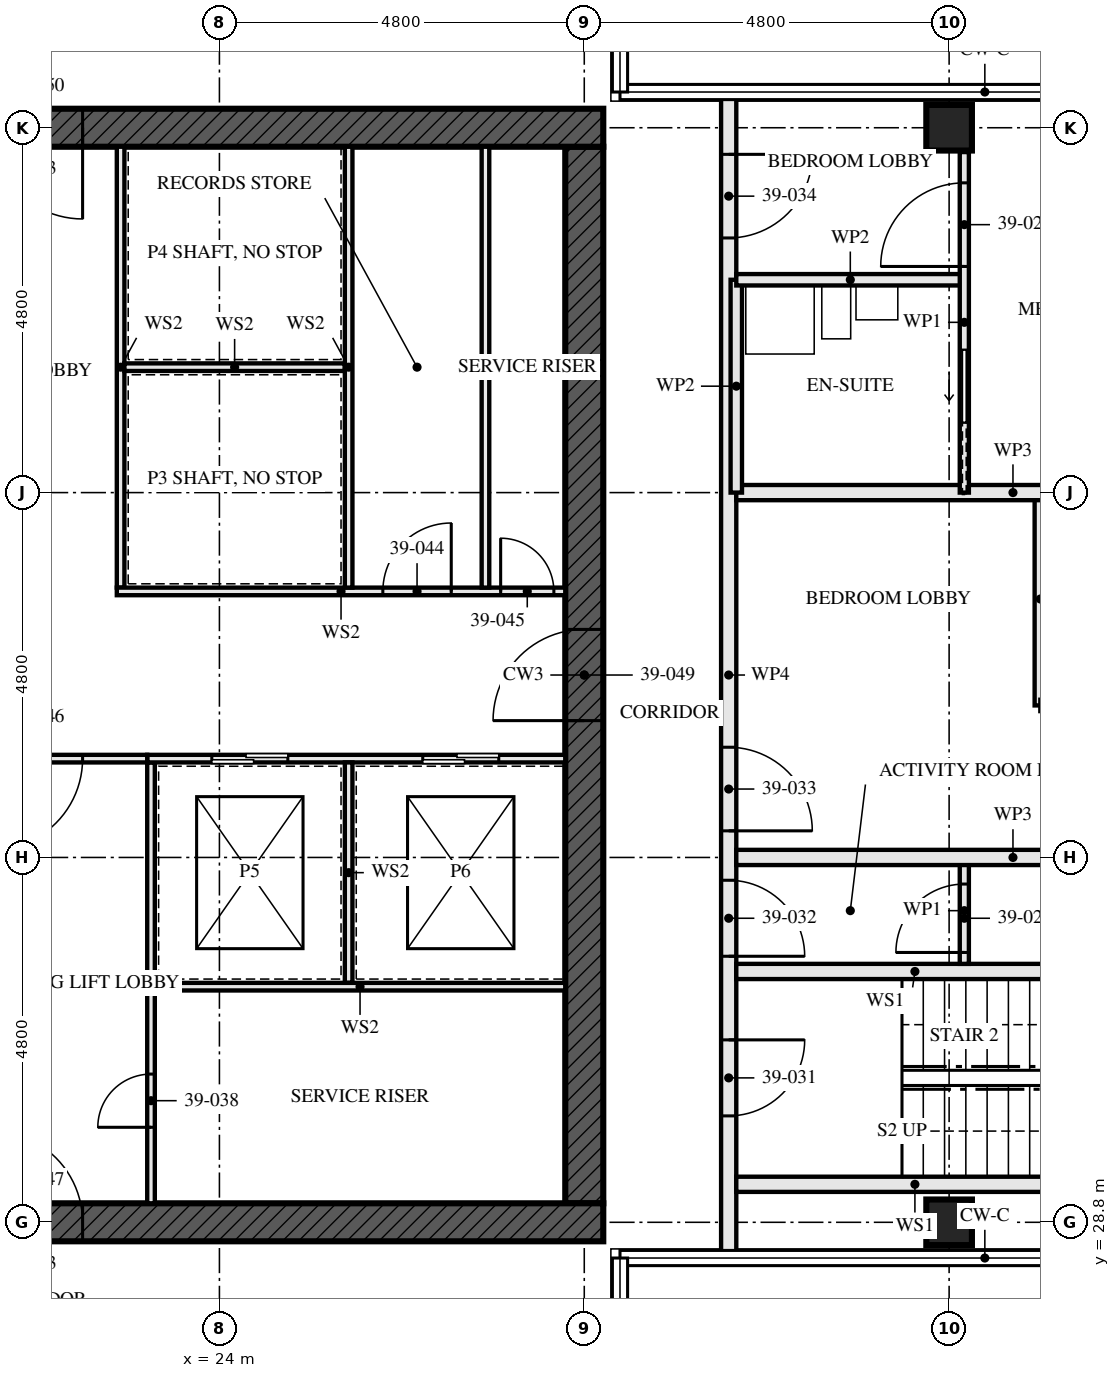
"""IFC4 building model, lengths in metres.
Left out: names, types, materials, properties, quantities, classifications, styles, units other than length and angle.
Written with IfcOpenShell. Run it as: python <this file> out.ifc"""

import sys

from ifc_helpers import new_model, si_unit, direction, frame, frame_2d, origin, origin_2d, place, context, subcontext, project, spatial, rectangle, hollow_rectangle, extrude, element, fill, save


model = new_model("IFC4")
c1 = context("Model", 3, precision=1e-05, world=origin(), true_north=direction((0.0, 1.0)))
c2 = subcontext(c1, "Body", "Model", "MODEL_VIEW")
j1 = project(units=[si_unit("LENGTHUNIT", "METRE"), si_unit("PLANEANGLEUNIT", "RADIAN")], contexts=[c1])
p1 = place(None, origin())
s1 = spatial("IfcSite", under=j1, at=p1, CompositionType="ELEMENT")
p2 = place(p1, origin())
s2 = spatial("IfcBuilding", under=s1, at=p2, CompositionType="ELEMENT")
p3 = place(p2, frame((0.0, 0.0, 144.5)))
s3 = spatial("IfcBuildingStorey", under=s2, at=p3, CompositionType="ELEMENT", Elevation=144.5)
for number, where, z_axis, x_axis in (
    (1, (33.6, 28.8, 0.0), (0.0, 0.0, 1.0), (0.0, 1.0, 0.0)),
    (2, (33.6, 43.2, 0.0), (0.0, 0.0, 1.0), (0.0, 1.0, 0.0)),
):
    element("IfcColumn", number, at=place(p3, frame(where, z_axis=z_axis, x_axis=x_axis)), inside=s3, PredefinedType="COLUMN", context=c2, shape_type="SweptSolid", body=[
        extrude(hollow_rectangle(XDim=0.6, YDim=0.6, WallThickness=0.08, at=origin_2d()), origin(), (0.0, 0.0, 1.0), 3.5),
    ])
p4 = place(p3, frame((14.15, 28.8, -0.17), z_axis=(0.0, 0.0, 1.0), x_axis=(1.0, 0.0, 0.0)))
e3 = element("IfcWall", 3, at=p4, inside=s3, PredefinedType="SHEAR", context=c2, shape_type="SweptSolid", body=[
    extrude(rectangle(XDim=14.9, YDim=0.5, at=frame_2d((7.45, 0.0))), origin(), (0.0, 0.0, 1.0), 3.5),
])
p5 = place(p4, frame((6.85, 0.0, 0.17)))
e4 = element("IfcOpeningElement", 4, at=p5, cuts=e3, PredefinedType="OPENING", context=c2, shape_type="SweptSolid", body=[
    extrude(rectangle(XDim=1.2, YDim=2.1, at=frame_2d((0.6, 1.05))), frame((0.0, 0.26, 0.0), z_axis=(0.0, -1.0, 0.0), x_axis=(1.0, 0.0, 0.0)), (0.0, 0.0, 1.0), 0.521),
])
p6 = place(p3, frame((29.05, 43.2, -0.17), z_axis=(0.0, 0.0, 1.0), x_axis=(-1.0, 0.0, 0.0)))
e5 = element("IfcWall", 5, at=p6, inside=s3, PredefinedType="SHEAR", context=c2, shape_type="SweptSolid", body=[
    extrude(rectangle(XDim=14.9, YDim=0.5, at=frame_2d((7.45, 0.0))), origin(), (0.0, 0.0, 1.0), 3.5),
])
p7 = place(p6, frame((6.85, 0.0, 0.17)))
e6 = element("IfcOpeningElement", 6, at=p7, cuts=e5, PredefinedType="OPENING", context=c2, shape_type="SweptSolid", body=[
    extrude(rectangle(XDim=1.2, YDim=2.1, at=frame_2d((0.6, 1.05))), frame((0.0, 0.26, 0.0), z_axis=(0.0, -1.0, 0.0), x_axis=(1.0, 0.0, 0.0)), (0.0, 0.0, 1.0), 0.521),
])
p8 = place(p3, frame((28.8, 29.05, -0.17), z_axis=(0.0, 0.0, 1.0), x_axis=(0.0, 1.0, 0.0)))
e7 = element("IfcWall", 7, at=p8, inside=s3, PredefinedType="SHEAR", context=c2, shape_type="SweptSolid", body=[
    extrude(rectangle(XDim=13.9, YDim=0.5, at=frame_2d((6.95, 0.0))), origin(), (0.0, 0.0, 1.0), 3.5),
])
p9 = place(p8, frame((6.35, 0.0, 0.17)))
e8 = element("IfcOpeningElement", 8, at=p9, cuts=e7, PredefinedType="OPENING", context=c2, shape_type="SweptSolid", body=[
    extrude(rectangle(XDim=1.2, YDim=2.1, at=frame_2d((0.6, 1.05))), frame((0.0, 0.26, 0.0), z_axis=(0.0, -1.0, 0.0), x_axis=(1.0, 0.0, 0.0)), (0.0, 0.0, 1.0), 0.521),
])
for number, where, z_axis, x_axis in (
    (9, (35.5, 29.3, 0.0), (0.0, 0.0, 1.0), (-1.0, 0.0, 0.0)),
    (10, (35.5, 32.1, 0.0), (0.0, 0.0, 1.0), (-1.0, 0.0, 0.0)),
):
    element("IfcWall", number, at=place(p3, frame(where, z_axis=z_axis, x_axis=x_axis)), inside=s3, PredefinedType="SOLIDWALL", context=c2, shape_type="SweptSolid", body=[
        extrude(rectangle(XDim=4.7, YDim=0.2, at=frame_2d((2.35, 0.0))), origin(), (0.0, 0.0, 1.0), 2.99),
    ])
p10 = place(p3, frame((33.8, 32.2, 0.0), z_axis=(0.0, 0.0, 1.0), x_axis=(0.0, 1.0, 0.0)))
e11 = element("IfcWall", 11, at=p10, inside=s3, PredefinedType="PARTITIONING", context=c2, shape_type="SweptSolid", body=[
    extrude(rectangle(XDim=1.4, YDim=0.12, at=frame_2d((0.7, 0.0))), origin(), (0.0, 0.0, 1.0), 3.33),
])
p11 = place(p10, frame((0.15, 0.0, 0.0)))
e12 = element("IfcOpeningElement", 12, at=p11, cuts=e11, PredefinedType="OPENING", context=c2, shape_type="SweptSolid", body=[
    extrude(rectangle(XDim=0.9, YDim=2.1, at=frame_2d((0.45, 1.05))), frame((0.0, 0.071, 0.0), z_axis=(0.0, -1.0, 0.0), x_axis=(1.0, 0.0, 0.0)), (0.0, 0.0, 1.0), 0.141),
])
p12 = place(p3, frame((38.08, 33.6, 0.0), z_axis=(0.0, 0.0, 1.0), x_axis=(-1.0, 0.0, 0.0)))
e13 = element("IfcWall", 13, at=p12, inside=s3, PredefinedType="PARTITIONING", context=c2, shape_type="SweptSolid", body=[
    extrude(rectangle(XDim=7.28, YDim=0.2, at=frame_2d((3.64, 0.0))), origin(), (0.0, 0.0, 1.0), 2.55),
])
p13 = place(p3, frame((34.8, 35.6, 0.0), z_axis=(0.0, 0.0, 1.0), x_axis=(0.0, 1.0, 0.0)))
e14 = element("IfcWall", 14, at=p13, inside=s3, PredefinedType="PARTITIONING", context=c2, shape_type="SweptSolid", body=[
    extrude(rectangle(XDim=2.8, YDim=0.15, at=frame_2d((1.4, 0.0))), origin(), (0.0, 0.0, 1.0), 3.33),
])
p14 = place(p3, frame((38.08, 38.4, 0.0), z_axis=(0.0, 0.0, 1.0), x_axis=(-1.0, 0.0, 0.0)))
e15 = element("IfcWall", 15, at=p14, inside=s3, PredefinedType="PARTITIONING", context=c2, shape_type="SweptSolid", body=[
    extrude(rectangle(XDim=7.28, YDim=0.2, at=frame_2d((3.64, 0.0))), origin(), (0.0, 0.0, 1.0), 2.55),
])
p15 = place(p3, frame((33.8, 41.2, 0.0), z_axis=(0.0, 0.0, 1.0), x_axis=(-1.0, 0.0, 0.0)))
e16 = element("IfcWall", 16, at=p15, inside=s3, PredefinedType="PARTITIONING", context=c2, shape_type="SweptSolid", body=[
    extrude(rectangle(XDim=3.0, YDim=0.15, at=frame_2d((1.5, 0.0))), origin(), (0.0, 0.0, 1.0), 3.33),
])
p16 = place(p3, frame((30.8, 38.4, 0.0), z_axis=(0.0, 0.0, 1.0), x_axis=(0.0, 1.0, 0.0)))
e17 = element("IfcWall", 17, at=p16, inside=s3, PredefinedType="PARTITIONING", context=c2, shape_type="SweptSolid", body=[
    extrude(rectangle(XDim=2.8, YDim=0.15, at=frame_2d((1.4, 0.0))), origin(), (0.0, 0.0, 1.0), 3.33),
])
p17 = place(p3, frame((33.8, 38.4, 0.0), z_axis=(0.0, 0.0, 1.0), x_axis=(0.0, 1.0, 0.0)))
e18 = element("IfcWall", 18, at=p17, inside=s3, PredefinedType="PARTITIONING", context=c2, shape_type="SweptSolid", body=[
    extrude(rectangle(XDim=4.48, YDim=0.12, at=frame_2d((2.24, 0.0))), origin(), (0.0, 0.0, 1.0), 3.33),
])
p18 = place(p17, frame((2.975, 0.0, 0.0)))
e19 = element("IfcOpeningElement", 19, at=p18, cuts=e18, PredefinedType="OPENING", context=c2, shape_type="SweptSolid", body=[
    extrude(rectangle(XDim=1.1, YDim=2.1, at=frame_2d((0.55, 1.05))), frame((0.0, 0.071, 0.0), z_axis=(0.0, -1.0, 0.0), x_axis=(1.0, 0.0, 0.0)), (0.0, 0.0, 1.0), 0.141),
])
p19 = place(p17, frame((0.925, 0.0, 0.0)))
e20 = element("IfcOpeningElement", 20, at=p19, cuts=e18, PredefinedType="OPENING", context=c2, shape_type="SweptSolid", body=[
    extrude(rectangle(XDim=0.95, YDim=2.1, at=frame_2d((0.475, 1.05))), frame((0.0, 0.071, 0.0), z_axis=(0.0, -1.0, 0.0), x_axis=(1.0, 0.0, 0.0)), (0.0, 0.0, 1.0), 0.141),
])
p20 = place(p3, frame((30.7, 28.35, 0.0), z_axis=(0.0, 0.0, 1.0), x_axis=(0.0, 1.0, 0.0)))
e21 = element("IfcWall", 21, at=p20, inside=s3, PredefinedType="PARTITIONING", context=c2, shape_type="SweptSolid", body=[
    extrude(rectangle(XDim=15.3, YDim=0.2, at=frame_2d((7.65, 0.0))), origin(), (0.0, 0.0, 1.0), 2.32),
])
p21 = place(p20, frame((1.85, 0.0, 0.0)))
e22 = element("IfcOpeningElement", 22, at=p21, cuts=e21, PredefinedType="OPENING", context=c2, shape_type="SweptSolid", body=[
    extrude(rectangle(XDim=1.0, YDim=2.1, at=frame_2d((0.5, 1.05))), frame((0.0, 0.111, 0.0), z_axis=(0.0, -1.0, 0.0), x_axis=(1.0, 0.0, 0.0)), (0.0, 0.0, 1.0), 0.221),
])
p22 = place(p20, frame((3.95, 0.0, 0.0)))
e23 = element("IfcOpeningElement", 23, at=p22, cuts=e21, PredefinedType="OPENING", context=c2, shape_type="SweptSolid", body=[
    extrude(rectangle(XDim=1.0, YDim=2.1, at=frame_2d((0.5, 1.05))), frame((0.0, 0.111, 0.0), z_axis=(0.0, -1.0, 0.0), x_axis=(1.0, 0.0, 0.0)), (0.0, 0.0, 1.0), 0.221),
])
p23 = place(p20, frame((5.6, 0.0, 0.0)))
e24 = element("IfcOpeningElement", 24, at=p23, cuts=e21, PredefinedType="OPENING", context=c2, shape_type="SweptSolid", body=[
    extrude(rectangle(XDim=1.1, YDim=2.1, at=frame_2d((0.55, 1.05))), frame((0.0, 0.111, 0.0), z_axis=(0.0, -1.0, 0.0), x_axis=(1.0, 0.0, 0.0)), (0.0, 0.0, 1.0), 0.221),
])
p24 = place(p20, frame((13.4, 0.0, 0.0)))
e25 = element("IfcOpeningElement", 25, at=p24, cuts=e21, PredefinedType="OPENING", context=c2, shape_type="SweptSolid", body=[
    extrude(rectangle(XDim=1.1, YDim=2.1, at=frame_2d((0.55, 1.05))), frame((0.0, 0.111, 0.0), z_axis=(0.0, -1.0, 0.0), x_axis=(1.0, 0.0, 0.0)), (0.0, 0.0, 1.0), 0.221),
])
for number, where, z_axis, x_axis in (
    (26, (27.5, 37.15, 0.0), (0.0, 0.0, 1.0), (0.0, 1.0, 0.0)),
    (27, (22.7, 37.15, 0.0), (0.0, 0.0, 1.0), (0.0, 1.0, 0.0)),
):
    element("IfcWall", number, at=place(p3, frame(where, z_axis=z_axis, x_axis=x_axis)), inside=s3, PredefinedType="SOLIDWALL", context=c2, shape_type="SweptSolid", body=[
        extrude(rectangle(XDim=5.8, YDim=0.1, at=frame_2d((2.9, 0.0))), origin(), (0.0, 0.0, 1.0), 3.33),
    ])
p25 = place(p3, frame((23.1, 29.05, 0.0), z_axis=(0.0, 0.0, 1.0), x_axis=(0.0, 1.0, 0.0)))
e28 = element("IfcWall", 28, at=p25, inside=s3, PredefinedType="SOLIDWALL", context=c2, shape_type="SweptSolid", body=[
    extrude(rectangle(XDim=5.8, YDim=0.1, at=frame_2d((2.9, 0.0))), origin(), (0.0, 0.0, 1.0), 3.33),
])
p26 = place(p25, frame((1.0, 0.0, 0.0)))
e29 = element("IfcOpeningElement", 29, at=p26, cuts=e28, PredefinedType="OPENING", context=c2, shape_type="SweptSolid", body=[
    extrude(rectangle(XDim=0.7, YDim=2.1, at=frame_2d((0.35, 1.05))), frame((0.0, 0.061, 0.0), z_axis=(0.0, -1.0, 0.0), x_axis=(1.0, 0.0, 0.0)), (0.0, 0.0, 1.0), 0.121),
])
p27 = place(p3, frame((23.05, 34.9, 0.0), z_axis=(0.0, 0.0, 1.0), x_axis=(1.0, 0.0, 0.0)))
e30 = element("IfcWall", 30, at=p27, inside=s3, PredefinedType="SOLIDWALL", context=c2, shape_type="SweptSolid", body=[
    extrude(rectangle(XDim=5.5, YDim=0.1, at=frame_2d((2.75, 0.0))), origin(), (0.0, 0.0, 1.0), 3.33),
])
p28 = place(p27, frame((0.85, 0.0, 0.0)))
e31 = element("IfcOpeningElement", 31, at=p28, cuts=e30, PredefinedType="OPENING", context=c2, shape_type="SweptSolid", body=[
    extrude(rectangle(XDim=1.0, YDim=2.1, at=frame_2d((0.5, 1.05))), frame((0.0, 0.061, 0.0), z_axis=(0.0, -1.0, 0.0), x_axis=(1.0, 0.0, 0.0)), (0.0, 0.0, 1.0), 0.121),
])
p29 = place(p27, frame((3.625, 0.0, 0.0)))
e32 = element("IfcOpeningElement", 32, at=p29, cuts=e30, PredefinedType="OPENING", context=c2, shape_type="SweptSolid", body=[
    extrude(rectangle(XDim=1.0, YDim=2.1, at=frame_2d((0.5, 1.05))), frame((0.0, 0.061, 0.0), z_axis=(0.0, -1.0, 0.0), x_axis=(1.0, 0.0, 0.0)), (0.0, 0.0, 1.0), 0.121),
])
p30 = place(p3, frame((22.65, 37.1, 0.0), z_axis=(0.0, 0.0, 1.0), x_axis=(1.0, 0.0, 0.0)))
e33 = element("IfcWall", 33, at=p30, inside=s3, PredefinedType="SOLIDWALL", context=c2, shape_type="SweptSolid", body=[
    extrude(rectangle(XDim=5.9, YDim=0.1, at=frame_2d((2.95, 0.0))), origin(), (0.0, 0.0, 1.0), 3.33),
])
p31 = place(p30, frame((3.5, 0.0, 0.0)))
e34 = element("IfcOpeningElement", 34, at=p31, cuts=e33, PredefinedType="OPENING", context=c2, shape_type="SweptSolid", body=[
    extrude(rectangle(XDim=0.9, YDim=2.1, at=frame_2d((0.45, 1.05))), frame((0.0, 0.061, 0.0), z_axis=(0.0, -1.0, 0.0), x_axis=(1.0, 0.0, 0.0)), (0.0, 0.0, 1.0), 0.121),
])
p32 = place(p30, frame((5.05, 0.0, 0.0)))
e35 = element("IfcOpeningElement", 35, at=p32, cuts=e33, PredefinedType="OPENING", context=c2, shape_type="SweptSolid", body=[
    extrude(rectangle(XDim=0.7, YDim=2.1, at=frame_2d((0.35, 1.05))), frame((0.0, 0.061, 0.0), z_axis=(0.0, -1.0, 0.0), x_axis=(1.0, 0.0, 0.0)), (0.0, 0.0, 1.0), 0.121),
])
p33 = place(p3, frame((20.55, 34.9, 0.0), z_axis=(0.0, 0.0, 1.0), x_axis=(1.0, 0.0, 0.0)))
e36 = element("IfcWall", 36, at=p33, inside=s3, PredefinedType="SOLIDWALL", context=c2, shape_type="SweptSolid", body=[
    extrude(rectangle(XDim=2.5, YDim=0.1, at=frame_2d((1.25, 0.0))), origin(), (0.0, 0.0, 1.0), 3.33),
])
p34 = place(p33, frame((0.45, 0.0, 0.0)))
e37 = element("IfcOpeningElement", 37, at=p34, cuts=e36, PredefinedType="OPENING", context=c2, shape_type="SweptSolid", body=[
    extrude(rectangle(XDim=1.2, YDim=2.1, at=frame_2d((0.6, 1.05))), frame((0.0, 0.061, 0.0), z_axis=(0.0, -1.0, 0.0), x_axis=(1.0, 0.0, 0.0)), (0.0, 0.0, 1.0), 0.121),
])
p35 = place(p3, frame((22.75, 40.05, 0.0), z_axis=(0.0, 0.0, 1.0), x_axis=(1.0, 0.0, 0.0)))
e38 = element("IfcWall", 38, at=p35, inside=s3, PredefinedType="SOLIDWALL", context=c2, shape_type="SweptSolid", body=[
    extrude(rectangle(XDim=2.9, YDim=0.1, at=frame_2d((1.45, 0.0))), origin(), (0.0, 0.0, 1.0), 3.33),
])
p36 = place(p3, frame((25.7, 37.15, 0.0), z_axis=(0.0, 0.0, 1.0), x_axis=(0.0, 1.0, 0.0)))
e39 = element("IfcWall", 39, at=p36, inside=s3, PredefinedType="SOLIDWALL", context=c2, shape_type="SweptSolid", body=[
    extrude(rectangle(XDim=5.8, YDim=0.1, at=frame_2d((2.9, 0.0))), origin(), (0.0, 0.0, 1.0), 3.33),
])
p37 = place(p3, frame((25.7, 31.95, 0.0), z_axis=(0.0, 0.0, 1.0), x_axis=(0.0, 1.0, 0.0)))
e40 = element("IfcWall", 40, at=p37, inside=s3, PredefinedType="SOLIDWALL", context=c2, shape_type="SweptSolid", body=[
    extrude(rectangle(XDim=2.9, YDim=0.1, at=frame_2d((1.45, 0.0))), origin(), (0.0, 0.0, 1.0), 3.33),
])
p38 = place(p3, frame((23.15, 31.9, 0.0), z_axis=(0.0, 0.0, 1.0), x_axis=(1.0, 0.0, 0.0)))
e41 = element("IfcWall", 41, at=p38, inside=s3, PredefinedType="SOLIDWALL", context=c2, shape_type="SweptSolid", body=[
    extrude(rectangle(XDim=5.4, YDim=0.1, at=frame_2d((2.7, 0.0))), origin(), (0.0, 0.0, 1.0), 3.33),
])
p39 = place(p11, origin())
e42 = element("IfcDoor", 42, at=p39, inside=s3, OperationType="SINGLE_SWING_RIGHT", PredefinedType="DOOR", context=c2, shape_type="SweptSolid", body=[
    extrude(rectangle(XDim=0.9, YDim=2.1, at=frame_2d((0.45, 1.05))), frame((0.0, 0.022, 0.0), z_axis=(0.0, -1.0, 0.0), x_axis=(1.0, 0.0, 0.0)), (0.0, 0.0, 1.0), 0.044),
])
fill(e12, e42)
p40 = place(p18, origin())
e43 = element("IfcDoor", 43, at=p40, inside=s3, OperationType="SINGLE_SWING_RIGHT", PredefinedType="DOOR", context=c2, shape_type="SweptSolid", body=[
    extrude(rectangle(XDim=1.1, YDim=2.1, at=frame_2d((0.55, 1.05))), frame((0.0, 0.022, 0.0), z_axis=(0.0, -1.0, 0.0), x_axis=(1.0, 0.0, 0.0)), (0.0, 0.0, 1.0), 0.044),
])
fill(e19, e43)
p41 = place(p19, origin())
e44 = element("IfcDoor", 44, at=p41, inside=s3, OperationType="SLIDING_TO_RIGHT", PredefinedType="DOOR", context=c2, shape_type="SweptSolid", body=[
    extrude(rectangle(XDim=0.95, YDim=2.1, at=frame_2d((0.475, 1.05))), frame((0.0, 0.022, 0.0), z_axis=(0.0, -1.0, 0.0), x_axis=(1.0, 0.0, 0.0)), (0.0, 0.0, 1.0), 0.044),
])
fill(e20, e44)
p42 = place(p21, frame((1.0, 0.0, 0.0), z_axis=(0.0, 0.0, 1.0), x_axis=(-1.0, 0.0, 0.0)))
e45 = element("IfcDoor", 45, at=p42, inside=s3, OperationType="SINGLE_SWING_RIGHT", PredefinedType="DOOR", context=c2, shape_type="SweptSolid", body=[
    extrude(rectangle(XDim=1.0, YDim=2.1, at=frame_2d((0.5, 1.05))), frame((0.0, 0.032, 0.0), z_axis=(0.0, -1.0, 0.0), x_axis=(1.0, 0.0, 0.0)), (0.0, 0.0, 1.0), 0.064),
])
fill(e22, e45)
p43 = place(p22, frame((1.0, 0.0, 0.0), z_axis=(0.0, 0.0, 1.0), x_axis=(-1.0, 0.0, 0.0)))
e46 = element("IfcDoor", 46, at=p43, inside=s3, OperationType="SINGLE_SWING_LEFT", PredefinedType="DOOR", context=c2, shape_type="SweptSolid", body=[
    extrude(rectangle(XDim=1.0, YDim=2.1, at=frame_2d((0.5, 1.05))), frame((0.0, 0.027, 0.0), z_axis=(0.0, -1.0, 0.0), x_axis=(1.0, 0.0, 0.0)), (0.0, 0.0, 1.0), 0.054),
])
fill(e23, e46)
p44 = place(p23, frame((1.1, 0.0, 0.0), z_axis=(0.0, 0.0, 1.0), x_axis=(-1.0, 0.0, 0.0)))
e47 = element("IfcDoor", 47, at=p44, inside=s3, OperationType="SINGLE_SWING_LEFT", PredefinedType="DOOR", context=c2, shape_type="SweptSolid", body=[
    extrude(rectangle(XDim=1.1, YDim=2.1, at=frame_2d((0.55, 1.05))), frame((0.0, 0.027, 0.0), z_axis=(0.0, -1.0, 0.0), x_axis=(1.0, 0.0, 0.0)), (0.0, 0.0, 1.0), 0.054),
])
fill(e24, e47)
p45 = place(p24, frame((1.1, 0.0, 0.0), z_axis=(0.0, 0.0, 1.0), x_axis=(-1.0, 0.0, 0.0)))
e48 = element("IfcDoor", 48, at=p45, inside=s3, OperationType="SINGLE_SWING_RIGHT", PredefinedType="DOOR", context=c2, shape_type="SweptSolid", body=[
    extrude(rectangle(XDim=1.1, YDim=2.1, at=frame_2d((0.55, 1.05))), frame((0.0, 0.027, 0.0), z_axis=(0.0, -1.0, 0.0), x_axis=(1.0, 0.0, 0.0)), (0.0, 0.0, 1.0), 0.054),
])
fill(e25, e48)
p46 = place(p26, origin())
e49 = element("IfcDoor", 49, at=p46, inside=s3, OperationType="SINGLE_SWING_RIGHT", PredefinedType="DOOR", context=c2, shape_type="SweptSolid", body=[
    extrude(rectangle(XDim=0.7, YDim=2.1, at=frame_2d((0.35, 1.05))), frame((0.0, 0.027, 0.0), z_axis=(0.0, -1.0, 0.0), x_axis=(1.0, 0.0, 0.0)), (0.0, 0.0, 1.0), 0.054),
])
fill(e29, e49)
p47 = place(p28, origin())
e50 = element("IfcDoor", 50, at=p47, inside=s3, OperationType="SLIDING_TO_LEFT", PredefinedType="DOOR", context=c2, shape_type="SweptSolid", body=[
    extrude(rectangle(XDim=1.0, YDim=2.1, at=frame_2d((0.5, 1.05))), frame((0.0, 0.05, 0.0), z_axis=(0.0, -1.0, 0.0), x_axis=(1.0, 0.0, 0.0)), (0.0, 0.0, 1.0), 0.1),
])
fill(e31, e50)
p48 = place(p29, origin())
e51 = element("IfcDoor", 51, at=p48, inside=s3, OperationType="SLIDING_TO_LEFT", PredefinedType="DOOR", context=c2, shape_type="SweptSolid", body=[
    extrude(rectangle(XDim=1.0, YDim=2.1, at=frame_2d((0.5, 1.05))), frame((0.0, 0.05, 0.0), z_axis=(0.0, -1.0, 0.0), x_axis=(1.0, 0.0, 0.0)), (0.0, 0.0, 1.0), 0.1),
])
fill(e32, e51)
p49 = place(p31, origin())
e52 = element("IfcDoor", 52, at=p49, inside=s3, OperationType="SINGLE_SWING_LEFT", PredefinedType="DOOR", context=c2, shape_type="SweptSolid", body=[
    extrude(rectangle(XDim=0.9, YDim=2.1, at=frame_2d((0.45, 1.05))), frame((0.0, 0.027, 0.0), z_axis=(0.0, -1.0, 0.0), x_axis=(1.0, 0.0, 0.0)), (0.0, 0.0, 1.0), 0.054),
])
fill(e34, e52)
p50 = place(p32, origin())
e53 = element("IfcDoor", 53, at=p50, inside=s3, OperationType="SINGLE_SWING_RIGHT", PredefinedType="DOOR", context=c2, shape_type="SweptSolid", body=[
    extrude(rectangle(XDim=0.7, YDim=2.1, at=frame_2d((0.35, 1.05))), frame((0.0, 0.027, 0.0), z_axis=(0.0, -1.0, 0.0), x_axis=(1.0, 0.0, 0.0)), (0.0, 0.0, 1.0), 0.054),
])
fill(e35, e53)
p51 = place(p34, frame((1.2, 0.0, 0.0), z_axis=(0.0, 0.0, 1.0), x_axis=(-1.0, 0.0, 0.0)))
e54 = element("IfcDoor", 54, at=p51, inside=s3, OperationType="SINGLE_SWING_LEFT", PredefinedType="DOOR", context=c2, shape_type="SweptSolid", body=[
    extrude(rectangle(XDim=1.2, YDim=2.1, at=frame_2d((0.6, 1.05))), frame((0.0, 0.027, 0.0), z_axis=(0.0, -1.0, 0.0), x_axis=(1.0, 0.0, 0.0)), (0.0, 0.0, 1.0), 0.054),
])
fill(e37, e54)
p52 = place(p5, origin())
e55 = element("IfcDoor", 55, at=p52, inside=s3, OperationType="SINGLE_SWING_LEFT", PredefinedType="DOOR", context=c2, shape_type="SweptSolid", body=[
    extrude(rectangle(XDim=1.2, YDim=2.1, at=frame_2d((0.6, 1.05))), frame((0.0, 0.027, 0.0), z_axis=(0.0, -1.0, 0.0), x_axis=(1.0, 0.0, 0.0)), (0.0, 0.0, 1.0), 0.054),
])
fill(e4, e55)
p53 = place(p9, origin())
e56 = element("IfcDoor", 56, at=p53, inside=s3, OperationType="SINGLE_SWING_LEFT", PredefinedType="DOOR", context=c2, shape_type="SweptSolid", body=[
    extrude(rectangle(XDim=1.2, YDim=2.1, at=frame_2d((0.6, 1.05))), frame((0.0, 0.027, 0.0), z_axis=(0.0, -1.0, 0.0), x_axis=(1.0, 0.0, 0.0)), (0.0, 0.0, 1.0), 0.054),
])
fill(e8, e56)
p54 = place(p7, origin())
e57 = element("IfcDoor", 57, at=p54, inside=s3, OperationType="SINGLE_SWING_LEFT", PredefinedType="DOOR", context=c2, shape_type="SweptSolid", body=[
    extrude(rectangle(XDim=1.2, YDim=2.1, at=frame_2d((0.6, 1.05))), frame((0.0, 0.027, 0.0), z_axis=(0.0, -1.0, 0.0), x_axis=(1.0, 0.0, 0.0)), (0.0, 0.0, 1.0), 0.054),
])
fill(e6, e57)
save(model, sys.argv[1])
